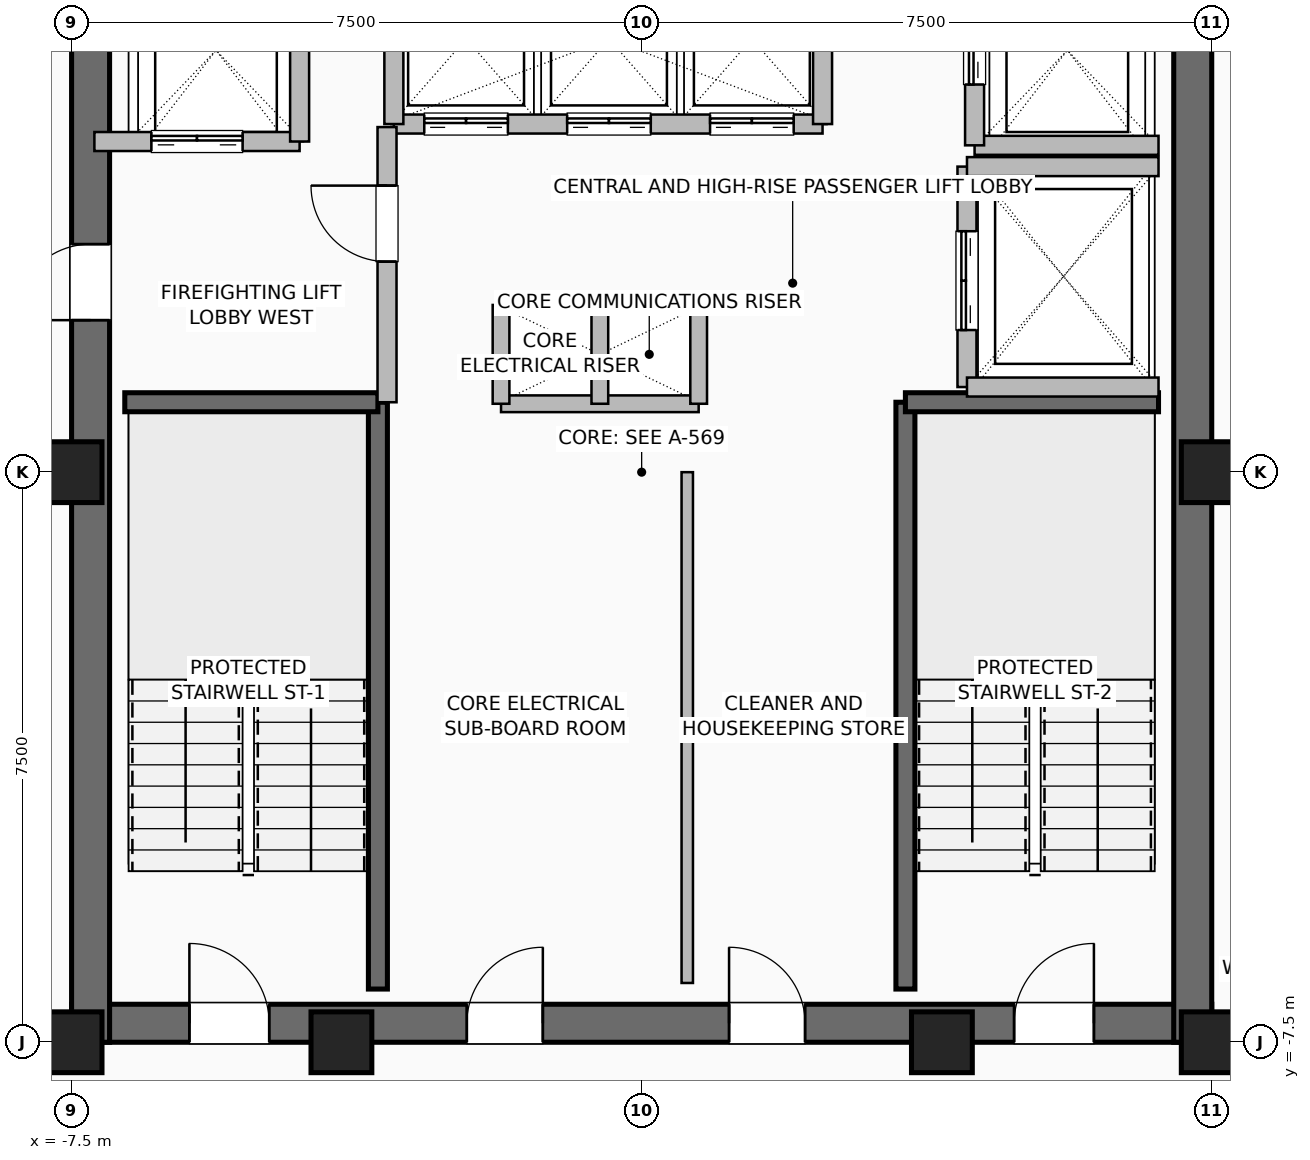
"""IFC4 building model, lengths in metres.
Left out: names, types, materials, properties, quantities, classifications, styles, units other than length and angle.
Written with IfcOpenShell. Run it as: python <this file> out.ifc"""

import sys

from ifc_helpers import new_model, si_unit, direction, frame, frame_2d, origin, origin_2d, place, context, subcontext, project, spatial, rectangle, hollow_rectangle, extrude, element, fill, save


model = new_model("IFC4")
c1 = context("Model", 3, precision=1e-05, world=origin(), true_north=direction((0.0, 1.0)))
c2 = subcontext(c1, "Body", "Model", "MODEL_VIEW")
j1 = project(units=[si_unit("LENGTHUNIT", "METRE"), si_unit("PLANEANGLEUNIT", "RADIAN")], contexts=[c1])
p1 = place(None, origin())
s1 = spatial("IfcSite", under=j1, at=p1, CompositionType="ELEMENT")
p2 = place(p1, origin())
s2 = spatial("IfcBuilding", under=s1, at=p2, CompositionType="ELEMENT")
p3 = place(p2, frame((0.0, 0.0, 275.6)))
s3 = spatial("IfcBuildingStorey", under=s2, at=p3, CompositionType="ELEMENT", Elevation=275.6)
for number, where, z_axis, x_axis in (
    (1, (-7.5, -7.5, 0.0), (0.0, 0.0, 1.0), (1.0, 0.0, 0.0)),
    (2, (-3.95, -7.5, 0.0), (0.0, 0.0, 1.0), (1.0, 0.0, 0.0)),
    (3, (3.95, -7.5, 0.0), (0.0, 0.0, 1.0), (1.0, 0.0, 0.0)),
    (4, (7.5, -7.5, 0.0), (0.0, 0.0, 1.0), (1.0, 0.0, 0.0)),
    (5, (7.5, 0.0, 0.0), (0.0, 0.0, 1.0), (1.0, 0.0, 0.0)),
    (6, (-7.5, 0.0, 0.0), (0.0, 0.0, 1.0), (1.0, 0.0, 0.0)),
):
    element("IfcColumn", number, at=place(p3, frame(where, z_axis=z_axis, x_axis=x_axis)), inside=s3, PredefinedType="COLUMN", context=c2, shape_type="SweptSolid", body=[
        extrude(hollow_rectangle(XDim=0.8, YDim=0.8, WallThickness=0.04, at=origin_2d()), origin(), (0.0, 0.0, 1.0), 3.6),
    ])
p4 = place(p3, frame((-7.5, -7.25, 0.0), z_axis=(0.0, 0.0, 1.0), x_axis=(1.0, 0.0, 0.0)))
e7 = element("IfcWall", 7, at=p4, inside=s3, PredefinedType="SHEAR", context=c2, shape_type="SweptSolid", body=[
    extrude(rectangle(XDim=15.0, YDim=0.5, at=frame_2d((7.5, 0.0))), origin(), (0.0, 0.0, 1.0), 3.36),
])
p5 = place(p4, frame((1.55, 0.0, 0.0)))
e8 = element("IfcOpeningElement", 8, at=p5, cuts=e7, PredefinedType="OPENING", context=c2, shape_type="SweptSolid", body=[
    extrude(rectangle(XDim=1.05, YDim=2.08, at=frame_2d((0.525, 1.04))), frame((0.0, 0.26, 0.0), z_axis=(0.0, -1.0, 0.0), x_axis=(1.0, 0.0, 0.0)), (0.0, 0.0, 1.0), 0.52),
])
p6 = place(p4, frame((12.4, 0.0, 0.0)))
e9 = element("IfcOpeningElement", 9, at=p6, cuts=e7, PredefinedType="OPENING", context=c2, shape_type="SweptSolid", body=[
    extrude(rectangle(XDim=1.05, YDim=2.08, at=frame_2d((0.525, 1.04))), frame((0.0, 0.26, 0.0), z_axis=(0.0, -1.0, 0.0), x_axis=(1.0, 0.0, 0.0)), (0.0, 0.0, 1.0), 0.52),
])
p7 = place(p4, frame((5.2, 0.0, 0.0)))
e10 = element("IfcOpeningElement", 10, at=p7, cuts=e7, PredefinedType="OPENING", context=c2, shape_type="SweptSolid", body=[
    extrude(rectangle(XDim=1.0, YDim=2.08, at=frame_2d((0.5, 1.04))), frame((0.0, 0.26, 0.0), z_axis=(0.0, -1.0, 0.0), x_axis=(1.0, 0.0, 0.0)), (0.0, 0.0, 1.0), 0.52),
])
p8 = place(p4, frame((8.65, 0.0, 0.0)))
e11 = element("IfcOpeningElement", 11, at=p8, cuts=e7, PredefinedType="OPENING", context=c2, shape_type="SweptSolid", body=[
    extrude(rectangle(XDim=1.0, YDim=2.08, at=frame_2d((0.5, 1.04))), frame((0.0, 0.26, 0.0), z_axis=(0.0, -1.0, 0.0), x_axis=(1.0, 0.0, 0.0)), (0.0, 0.0, 1.0), 0.52),
])
p9 = place(p3, frame((-7.25, -7.5, 0.0), z_axis=(0.0, 0.0, 1.0), x_axis=(0.0, 1.0, 0.0)))
e12 = element("IfcWall", 12, at=p9, inside=s3, PredefinedType="SHEAR", context=c2, shape_type="SweptSolid", body=[
    extrude(rectangle(XDim=15.0, YDim=0.5, at=frame_2d((7.5, 0.0))), origin(), (0.0, 0.0, 1.0), 3.36),
])
p10 = place(p9, frame((9.5, 0.0, 0.0)))
e13 = element("IfcOpeningElement", 13, at=p10, cuts=e12, PredefinedType="OPENING", context=c2, shape_type="SweptSolid", body=[
    extrude(rectangle(XDim=1.0, YDim=2.08, at=frame_2d((0.5, 1.04))), frame((0.0, 0.26, 0.0), z_axis=(0.0, -1.0, 0.0), x_axis=(1.0, 0.0, 0.0)), (0.0, 0.0, 1.0), 0.52),
])
p11 = place(p3, frame((7.25, -7.5, 0.0), z_axis=(0.0, 0.0, 1.0), x_axis=(0.0, 1.0, 0.0)))
e14 = element("IfcWall", 14, at=p11, inside=s3, PredefinedType="SHEAR", context=c2, shape_type="SweptSolid", body=[
    extrude(rectangle(XDim=15.0, YDim=0.5, at=frame_2d((7.5, 0.0))), origin(), (0.0, 0.0, 1.0), 3.36),
])
p12 = place(p3, frame((-3.47, -6.8, 0.0), z_axis=(0.0, 0.0, 1.0), x_axis=(0.0, 1.0, 0.0)))
e15 = element("IfcWall", 15, at=p12, inside=s3, PredefinedType="SHEAR", context=c2, shape_type="SweptSolid", body=[
    extrude(rectangle(XDim=7.72, YDim=0.25, at=frame_2d((3.86, 0.0))), origin(), (0.0, 0.0, 1.0), 3.36),
])
p13 = place(p3, frame((-6.8, 0.92, 0.0), z_axis=(0.0, 0.0, 1.0), x_axis=(1.0, 0.0, 0.0)))
e16 = element("IfcWall", 16, at=p13, inside=s3, PredefinedType="SHEAR", context=c2, shape_type="SweptSolid", body=[
    extrude(rectangle(XDim=3.33, YDim=0.25, at=frame_2d((1.665, 0.0))), origin(), (0.0, 0.0, 1.0), 3.36),
])
p14 = place(p3, frame((3.47, -6.8, 0.0), z_axis=(0.0, 0.0, 1.0), x_axis=(0.0, 1.0, 0.0)))
e17 = element("IfcWall", 17, at=p14, inside=s3, PredefinedType="SHEAR", context=c2, shape_type="SweptSolid", body=[
    extrude(rectangle(XDim=7.72, YDim=0.25, at=frame_2d((3.86, 0.0))), origin(), (0.0, 0.0, 1.0), 3.36),
])
p15 = place(p3, frame((3.47, 0.92, 0.0), z_axis=(0.0, 0.0, 1.0), x_axis=(1.0, 0.0, 0.0)))
e18 = element("IfcWall", 18, at=p15, inside=s3, PredefinedType="SHEAR", context=c2, shape_type="SweptSolid", body=[
    extrude(rectangle(XDim=3.33, YDim=0.25, at=frame_2d((1.665, 0.0))), origin(), (0.0, 0.0, 1.0), 3.36),
])
for number, where, z_axis, x_axis in (
    (19, (-1.85, 2.2, 0.0), (0.0, 0.0, 1.0), (1.0, 0.0, 0.0)),
    (20, (-1.85, 0.9, 0.0), (0.0, 0.0, 1.0), (1.0, 0.0, 0.0)),
):
    element("IfcWall", number, at=place(p3, frame(where, z_axis=z_axis, x_axis=x_axis)), inside=s3, PredefinedType="PARTITIONING", context=c2, shape_type="SweptSolid", body=[
        extrude(rectangle(XDim=2.6, YDim=0.22, at=frame_2d((1.3, 0.0))), origin(), (0.0, 0.0, 1.0), 3.36),
    ])
for number, where, z_axis, x_axis in (
    (21, (-0.55, 0.9, 0.0), (0.0, 0.0, 1.0), (0.0, 1.0, 0.0)),
    (22, (0.75, 0.9, 0.0), (0.0, 0.0, 1.0), (0.0, 1.0, 0.0)),
    (23, (-1.85, 0.9, 0.0), (0.0, 0.0, 1.0), (0.0, 1.0, 0.0)),
):
    element("IfcWall", number, at=place(p3, frame(where, z_axis=z_axis, x_axis=x_axis)), inside=s3, PredefinedType="PARTITIONING", context=c2, shape_type="SweptSolid", body=[
        extrude(rectangle(XDim=1.3, YDim=0.22, at=frame_2d((0.65, 0.0))), origin(), (0.0, 0.0, 1.0), 3.36),
    ])
p16 = place(p3, frame((-3.26, 4.58, 0.0), z_axis=(0.0, 0.0, 1.0), x_axis=(1.0, 0.0, 0.0)))
e24 = element("IfcWall", 24, at=p16, inside=s3, PredefinedType="SHEAR", context=c2, shape_type="SweptSolid", body=[
    extrude(rectangle(XDim=5.64, YDim=0.25, at=frame_2d((2.82, 0.0))), origin(), (0.0, 0.0, 1.0), 3.36),
])
p17 = place(p16, frame((0.4, 0.0, 0.0)))
e25 = element("IfcOpeningElement", 25, at=p17, cuts=e24, PredefinedType="OPENING", context=c2, shape_type="SweptSolid", body=[
    extrude(rectangle(XDim=1.1, YDim=2.2, at=frame_2d((0.55, 1.1))), frame((0.0, 0.135, 0.0), z_axis=(0.0, -1.0, 0.0), x_axis=(1.0, 0.0, 0.0)), (0.0, 0.0, 1.0), 0.27),
])
p18 = place(p16, frame((2.28, 0.0, 0.0)))
e26 = element("IfcOpeningElement", 26, at=p18, cuts=e24, PredefinedType="OPENING", context=c2, shape_type="SweptSolid", body=[
    extrude(rectangle(XDim=1.1, YDim=2.2, at=frame_2d((0.55, 1.1))), frame((0.0, 0.135, 0.0), z_axis=(0.0, -1.0, 0.0), x_axis=(1.0, 0.0, 0.0)), (0.0, 0.0, 1.0), 0.27),
])
p19 = place(p16, frame((4.16, 0.0, 0.0)))
e27 = element("IfcOpeningElement", 27, at=p19, cuts=e24, PredefinedType="OPENING", context=c2, shape_type="SweptSolid", body=[
    extrude(rectangle(XDim=1.1, YDim=2.2, at=frame_2d((0.55, 1.1))), frame((0.0, 0.135, 0.0), z_axis=(0.0, -1.0, 0.0), x_axis=(1.0, 0.0, 0.0)), (0.0, 0.0, 1.0), 0.27),
])
for number, where, z_axis, x_axis in (
    (28, (-3.26, 4.58, 0.0), (0.0, 0.0, 1.0), (0.0, 1.0, 0.0)),
    (29, (2.38, 4.58, 0.0), (0.0, 0.0, 1.0), (0.0, 1.0, 0.0)),
):
    element("IfcWall", number, at=place(p3, frame(where, z_axis=z_axis, x_axis=x_axis)), inside=s3, PredefinedType="SHEAR", context=c2, shape_type="SweptSolid", body=[
        extrude(rectangle(XDim=2.22, YDim=0.25, at=frame_2d((1.11, 0.0))), origin(), (0.0, 0.0, 1.0), 3.36),
    ])
p20 = place(p3, frame((-7.2, 4.35, 0.0), z_axis=(0.0, 0.0, 1.0), x_axis=(1.0, 0.0, 0.0)))
e30 = element("IfcWall", 30, at=p20, inside=s3, PredefinedType="SHEAR", context=c2, shape_type="SweptSolid", body=[
    extrude(rectangle(XDim=2.7, YDim=0.25, at=frame_2d((1.35, 0.0))), origin(), (0.0, 0.0, 1.0), 3.36),
])
p21 = place(p20, frame((0.75, 0.0, 0.0)))
e31 = element("IfcOpeningElement", 31, at=p21, cuts=e30, PredefinedType="OPENING", context=c2, shape_type="SweptSolid", body=[
    extrude(rectangle(XDim=1.2, YDim=2.2, at=frame_2d((0.6, 1.1))), frame((0.0, 0.135, 0.0), z_axis=(0.0, -1.0, 0.0), x_axis=(1.0, 0.0, 0.0)), (0.0, 0.0, 1.0), 0.27),
])
p22 = place(p3, frame((-4.5, 4.35, 0.0), z_axis=(0.0, 0.0, 1.0), x_axis=(0.0, 1.0, 0.0)))
e32 = element("IfcWall", 32, at=p22, inside=s3, PredefinedType="SHEAR", context=c2, shape_type="SweptSolid", body=[
    extrude(rectangle(XDim=2.85, YDim=0.25, at=frame_2d((1.425, 0.0))), origin(), (0.0, 0.0, 1.0), 3.36),
])
p23 = place(p3, frame((4.38, 4.3, 0.0), z_axis=(0.0, 0.0, 1.0), x_axis=(1.0, 0.0, 0.0)))
e33 = element("IfcWall", 33, at=p23, inside=s3, PredefinedType="SHEAR", context=c2, shape_type="SweptSolid", body=[
    extrude(rectangle(XDim=2.42, YDim=0.25, at=frame_2d((1.21, 0.0))), origin(), (0.0, 0.0, 1.0), 3.36),
])
p24 = place(p3, frame((4.38, 4.3, 0.0), z_axis=(0.0, 0.0, 1.0), x_axis=(0.0, 1.0, 0.0)))
e34 = element("IfcWall", 34, at=p24, inside=s3, PredefinedType="SHEAR", context=c2, shape_type="SweptSolid", body=[
    extrude(rectangle(XDim=2.5, YDim=0.25, at=frame_2d((1.25, 0.0))), origin(), (0.0, 0.0, 1.0), 3.36),
])
p25 = place(p24, frame((0.8, 0.0, 0.0)))
e35 = element("IfcOpeningElement", 35, at=p25, cuts=e34, PredefinedType="OPENING", context=c2, shape_type="SweptSolid", body=[
    extrude(rectangle(XDim=1.2, YDim=2.2, at=frame_2d((0.6, 1.1))), frame((0.0, 0.135, 0.0), z_axis=(0.0, -1.0, 0.0), x_axis=(1.0, 0.0, 0.0)), (0.0, 0.0, 1.0), 0.27),
])
p26 = place(p3, frame((4.28, 1.12, 0.0), z_axis=(0.0, 0.0, 1.0), x_axis=(0.0, 1.0, 0.0)))
e36 = element("IfcWall", 36, at=p26, inside=s3, PredefinedType="SHEAR", context=c2, shape_type="SweptSolid", body=[
    extrude(rectangle(XDim=2.9, YDim=0.25, at=frame_2d((1.45, 0.0))), origin(), (0.0, 0.0, 1.0), 3.36),
])
p27 = place(p26, frame((0.75, 0.0, 0.0)))
e37 = element("IfcOpeningElement", 37, at=p27, cuts=e36, PredefinedType="OPENING", context=c2, shape_type="SweptSolid", body=[
    extrude(rectangle(XDim=1.3, YDim=2.3, at=frame_2d((0.65, 1.15))), frame((0.0, 0.135, 0.0), z_axis=(0.0, -1.0, 0.0), x_axis=(1.0, 0.0, 0.0)), (0.0, 0.0, 1.0), 0.27),
])
for number, where, z_axis, x_axis in (
    (38, (4.28, 1.12, 0.0), (0.0, 0.0, 1.0), (1.0, 0.0, 0.0)),
    (39, (4.28, 4.02, 0.0), (0.0, 0.0, 1.0), (1.0, 0.0, 0.0)),
):
    element("IfcWall", number, at=place(p3, frame(where, z_axis=z_axis, x_axis=x_axis)), inside=s3, PredefinedType="SHEAR", context=c2, shape_type="SweptSolid", body=[
        extrude(rectangle(XDim=2.52, YDim=0.25, at=frame_2d((1.26, 0.0))), origin(), (0.0, 0.0, 1.0), 3.36),
    ])
p28 = place(p3, frame((-3.35, 0.92, 0.0), z_axis=(0.0, 0.0, 1.0), x_axis=(0.0, 1.0, 0.0)))
e40 = element("IfcWall", 40, at=p28, inside=s3, PredefinedType="SHEAR", context=c2, shape_type="SweptSolid", body=[
    extrude(rectangle(XDim=3.62, YDim=0.25, at=frame_2d((1.81, 0.0))), origin(), (0.0, 0.0, 1.0), 3.36),
])
p29 = place(p28, frame((1.85, 0.0, 0.0)))
e41 = element("IfcOpeningElement", 41, at=p29, cuts=e40, PredefinedType="OPENING", context=c2, shape_type="SweptSolid", body=[
    extrude(rectangle(XDim=1.0, YDim=2.08, at=frame_2d((0.5, 1.04))), frame((0.0, 0.135, 0.0), z_axis=(0.0, -1.0, 0.0), x_axis=(1.0, 0.0, 0.0)), (0.0, 0.0, 1.0), 0.27),
])
p30 = place(p3, frame((0.6, -6.72, 0.0), z_axis=(0.0, 0.0, 1.0), x_axis=(0.0, 1.0, 0.0)))
e42 = element("IfcWall", 42, at=p30, inside=s3, PredefinedType="PARTITIONING", context=c2, shape_type="SweptSolid", body=[
    extrude(rectangle(XDim=6.72, YDim=0.15, at=frame_2d((3.36, 0.0))), origin(), (0.0, 0.0, 1.0), 3.36),
])
p31 = place(p3, frame((7.45, -7.48, 0.0), z_axis=(0.0, 0.0, 1.0), x_axis=(1.0, 0.0, 0.0)))
e43 = element("IfcWall", 43, at=p31, inside=s3, PredefinedType="PARTITIONING", context=c2, shape_type="SweptSolid", body=[
    extrude(rectangle(XDim=0.95, YDim=0.15, at=frame_2d((0.475, 0.0))), origin(), (0.0, 0.0, 1.0), 3.36),
])
p32 = place(p5, origin())
e44 = element("IfcDoor", 44, at=p32, inside=s3, OperationType="SINGLE_SWING_LEFT", PredefinedType="DOOR", context=c2, shape_type="SweptSolid", body=[
    extrude(rectangle(XDim=1.05, YDim=2.08, at=frame_2d((0.525, 1.04))), frame((0.0, 0.025, 0.0), z_axis=(0.0, -1.0, 0.0), x_axis=(1.0, 0.0, 0.0)), (0.0, 0.0, 1.0), 0.05),
])
fill(e8, e44)
p33 = place(p6, origin())
e45 = element("IfcDoor", 45, at=p33, inside=s3, OperationType="SINGLE_SWING_RIGHT", PredefinedType="DOOR", context=c2, shape_type="SweptSolid", body=[
    extrude(rectangle(XDim=1.05, YDim=2.08, at=frame_2d((0.525, 1.04))), frame((0.0, 0.025, 0.0), z_axis=(0.0, -1.0, 0.0), x_axis=(1.0, 0.0, 0.0)), (0.0, 0.0, 1.0), 0.05),
])
fill(e9, e45)
p34 = place(p10, origin())
e46 = element("IfcDoor", 46, at=p34, inside=s3, OperationType="SINGLE_SWING_LEFT", PredefinedType="DOOR", context=c2, shape_type="SweptSolid", body=[
    extrude(rectangle(XDim=1.0, YDim=2.08, at=frame_2d((0.5, 1.04))), frame((0.0, 0.025, 0.0), z_axis=(0.0, -1.0, 0.0), x_axis=(1.0, 0.0, 0.0)), (0.0, 0.0, 1.0), 0.05),
])
fill(e13, e46)
p35 = place(p7, origin())
e47 = element("IfcDoor", 47, at=p35, inside=s3, OperationType="SINGLE_SWING_RIGHT", PredefinedType="DOOR", context=c2, shape_type="SweptSolid", body=[
    extrude(rectangle(XDim=1.0, YDim=2.08, at=frame_2d((0.5, 1.04))), frame((0.0, 0.025, 0.0), z_axis=(0.0, -1.0, 0.0), x_axis=(1.0, 0.0, 0.0)), (0.0, 0.0, 1.0), 0.05),
])
fill(e10, e47)
p36 = place(p8, origin())
e48 = element("IfcDoor", 48, at=p36, inside=s3, OperationType="SINGLE_SWING_LEFT", PredefinedType="DOOR", context=c2, shape_type="SweptSolid", body=[
    extrude(rectangle(XDim=1.0, YDim=2.08, at=frame_2d((0.5, 1.04))), frame((0.0, 0.025, 0.0), z_axis=(0.0, -1.0, 0.0), x_axis=(1.0, 0.0, 0.0)), (0.0, 0.0, 1.0), 0.05),
])
fill(e11, e48)
p37 = place(p17, origin())
e49 = element("IfcDoor", 49, at=p37, inside=s3, OperationType="DOUBLE_DOOR_SLIDING", PredefinedType="DOOR", context=c2, shape_type="SweptSolid", body=[
    extrude(rectangle(XDim=1.1, YDim=2.2, at=frame_2d((0.55, 1.1))), frame((0.0, 0.025, 0.0), z_axis=(0.0, -1.0, 0.0), x_axis=(1.0, 0.0, 0.0)), (0.0, 0.0, 1.0), 0.05),
])
fill(e25, e49)
p38 = place(p18, origin())
e50 = element("IfcDoor", 50, at=p38, inside=s3, OperationType="DOUBLE_DOOR_SLIDING", PredefinedType="DOOR", context=c2, shape_type="SweptSolid", body=[
    extrude(rectangle(XDim=1.1, YDim=2.2, at=frame_2d((0.55, 1.1))), frame((0.0, 0.025, 0.0), z_axis=(0.0, -1.0, 0.0), x_axis=(1.0, 0.0, 0.0)), (0.0, 0.0, 1.0), 0.05),
])
fill(e26, e50)
p39 = place(p19, origin())
e51 = element("IfcDoor", 51, at=p39, inside=s3, OperationType="DOUBLE_DOOR_SLIDING", PredefinedType="DOOR", context=c2, shape_type="SweptSolid", body=[
    extrude(rectangle(XDim=1.1, YDim=2.2, at=frame_2d((0.55, 1.1))), frame((0.0, 0.025, 0.0), z_axis=(0.0, -1.0, 0.0), x_axis=(1.0, 0.0, 0.0)), (0.0, 0.0, 1.0), 0.05),
])
fill(e27, e51)
p40 = place(p21, origin())
e52 = element("IfcDoor", 52, at=p40, inside=s3, OperationType="DOUBLE_DOOR_SLIDING", PredefinedType="DOOR", context=c2, shape_type="SweptSolid", body=[
    extrude(rectangle(XDim=1.2, YDim=2.2, at=frame_2d((0.6, 1.1))), frame((0.0, 0.025, 0.0), z_axis=(0.0, -1.0, 0.0), x_axis=(1.0, 0.0, 0.0)), (0.0, 0.0, 1.0), 0.05),
])
fill(e31, e52)
p41 = place(p25, origin())
e53 = element("IfcDoor", 53, at=p41, inside=s3, OperationType="DOUBLE_DOOR_SLIDING", PredefinedType="DOOR", context=c2, shape_type="SweptSolid", body=[
    extrude(rectangle(XDim=1.2, YDim=2.2, at=frame_2d((0.6, 1.1))), frame((0.0, 0.025, 0.0), z_axis=(0.0, -1.0, 0.0), x_axis=(1.0, 0.0, 0.0)), (0.0, 0.0, 1.0), 0.05),
])
fill(e35, e53)
p42 = place(p27, origin())
e54 = element("IfcDoor", 54, at=p42, inside=s3, OperationType="DOUBLE_DOOR_SLIDING", PredefinedType="DOOR", context=c2, shape_type="SweptSolid", body=[
    extrude(rectangle(XDim=1.3, YDim=2.3, at=frame_2d((0.65, 1.15))), frame((0.0, 0.025, 0.0), z_axis=(0.0, -1.0, 0.0), x_axis=(1.0, 0.0, 0.0)), (0.0, 0.0, 1.0), 0.05),
])
fill(e37, e54)
p43 = place(p29, origin())
e55 = element("IfcDoor", 55, at=p43, inside=s3, OperationType="SINGLE_SWING_RIGHT", PredefinedType="DOOR", context=c2, shape_type="SweptSolid", body=[
    extrude(rectangle(XDim=1.0, YDim=2.08, at=frame_2d((0.5, 1.04))), frame((0.0, 0.025, 0.0), z_axis=(0.0, -1.0, 0.0), x_axis=(1.0, 0.0, 0.0)), (0.0, 0.0, 1.0), 0.05),
])
fill(e41, e55)
save(model, sys.argv[1])
